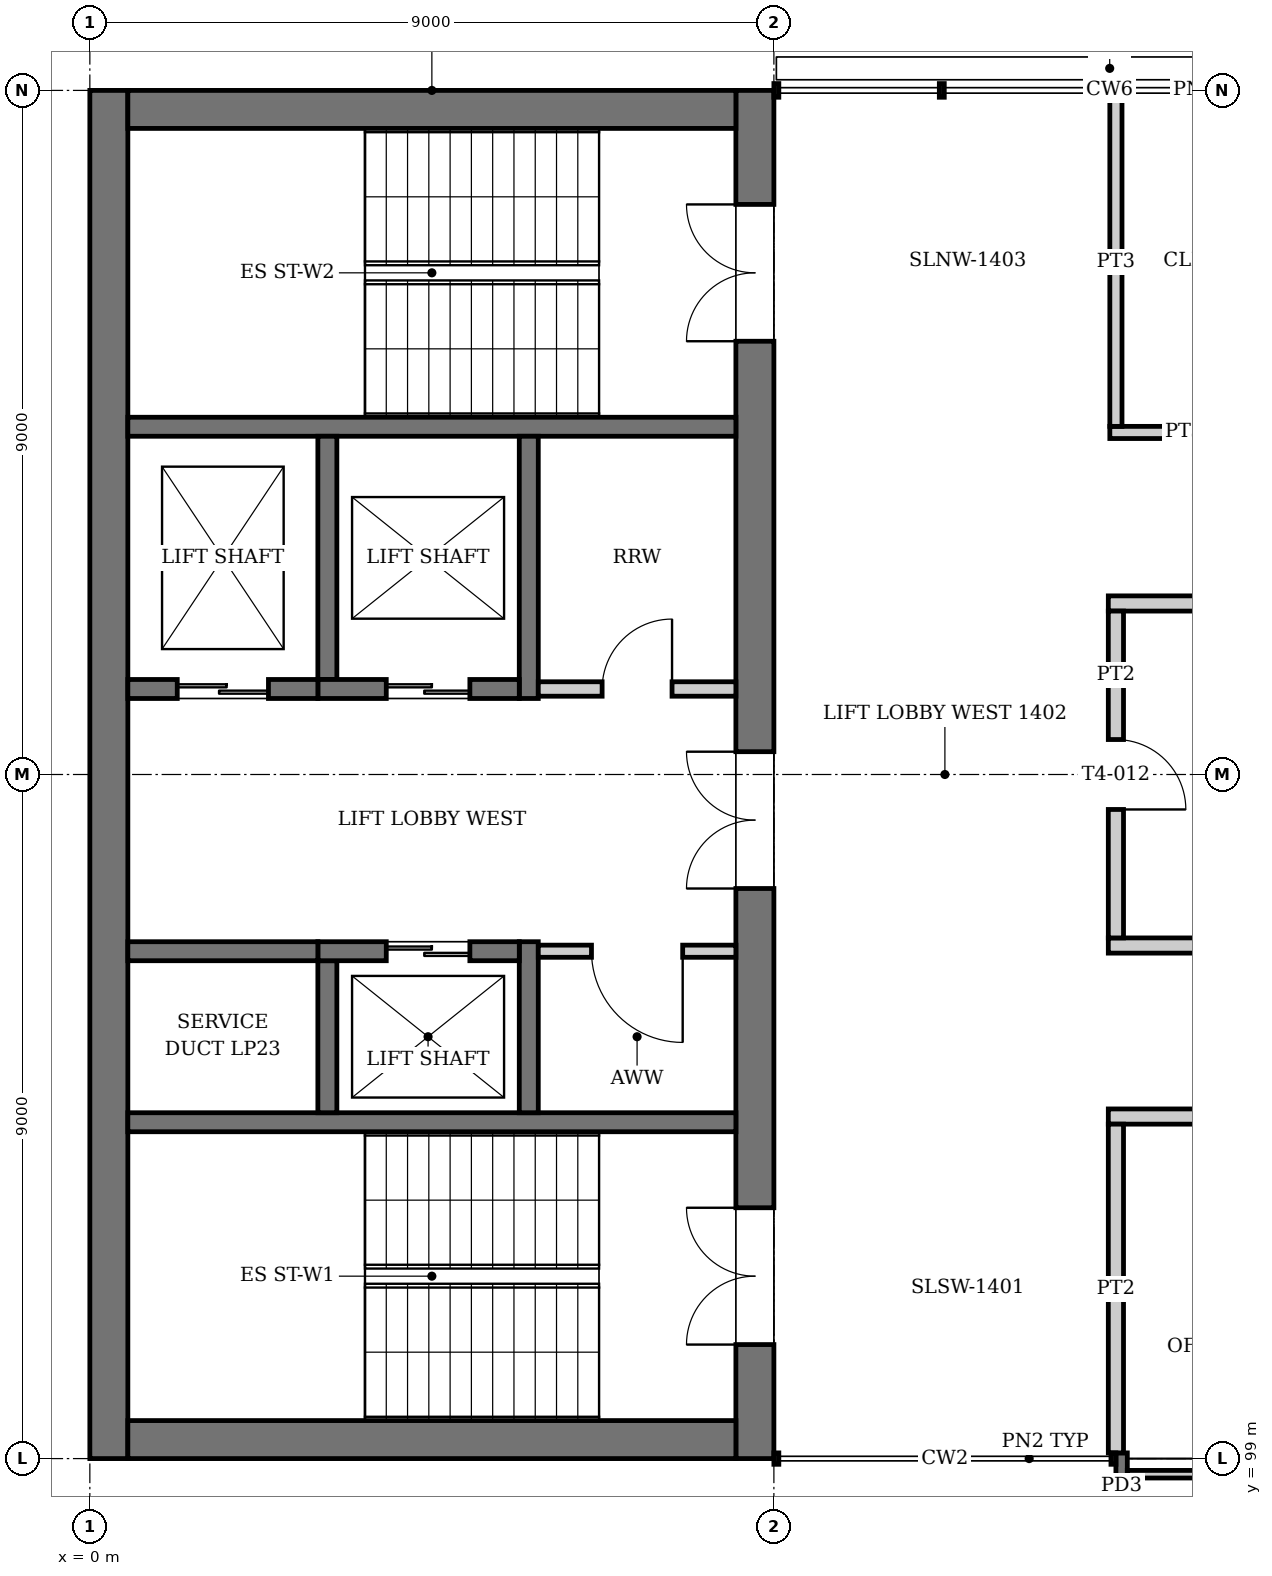
"""IFC4 building model, lengths in metres.
Left out: names, types, materials, properties, quantities, classifications, styles, units other than length and angle.
Written with IfcOpenShell. Run it as: python <this file> out.ifc"""

import sys

from ifc_helpers import new_model, si_unit, direction, frame, frame_2d, origin, place, context, subcontext, project, spatial, rectangle, extrude, element, fill, save


model = new_model("IFC4")
c1 = context("Model", 3, precision=1e-05, world=origin(), true_north=direction((0.0, 1.0)))
c2 = subcontext(c1, "Body", "Model", "MODEL_VIEW")
j1 = project(units=[si_unit("LENGTHUNIT", "METRE"), si_unit("PLANEANGLEUNIT", "RADIAN")], contexts=[c1])
p1 = place(None, origin())
s1 = spatial("IfcSite", under=j1, at=p1, CompositionType="ELEMENT")
p2 = place(p1, origin())
s2 = spatial("IfcBuilding", under=s1, at=p2, CompositionType="ELEMENT")
p3 = place(p2, frame((0.0, 0.0, 59.2)))
s3 = spatial("IfcBuildingStorey", under=s2, at=p3, CompositionType="ELEMENT", Elevation=59.2)
p4 = place(p3, frame((0.25, 99.0, 0.0), z_axis=(0.0, 0.0, 1.0), x_axis=(0.0, 1.0, 0.0)))
e1 = element("IfcWall", 1, at=p4, inside=s3, PredefinedType="SHEAR", context=c2, shape_type="SweptSolid", body=[
    extrude(rectangle(XDim=18.0, YDim=0.5, at=frame_2d((9.0, 0.0))), origin(), (0.0, 0.0, 1.0), 4.0),
])
p5 = place(p3, frame((8.75, 99.0, 0.0), z_axis=(0.0, 0.0, 1.0), x_axis=(0.0, 1.0, 0.0)))
e2 = element("IfcWall", 2, at=p5, inside=s3, PredefinedType="SHEAR", context=c2, shape_type="SweptSolid", body=[
    extrude(rectangle(XDim=18.0, YDim=0.5, at=frame_2d((9.0, 0.0))), origin(), (0.0, 0.0, 1.0), 4.0),
])
p6 = place(p5, frame((1.5, 0.0, 0.0)))
e3 = element("IfcOpeningElement", 3, at=p6, cuts=e2, PredefinedType="OPENING", context=c2, shape_type="SweptSolid", body=[
    extrude(rectangle(XDim=1.8, YDim=2.1, at=frame_2d((0.9, 1.05))), frame((0.0, 0.26, 0.0), z_axis=(0.0, -1.0, 0.0), x_axis=(1.0, 0.0, 0.0)), (0.0, 0.0, 1.0), 0.52),
])
p7 = place(p5, frame((14.7, 0.0, 0.0)))
e4 = element("IfcOpeningElement", 4, at=p7, cuts=e2, PredefinedType="OPENING", context=c2, shape_type="SweptSolid", body=[
    extrude(rectangle(XDim=1.8, YDim=2.1, at=frame_2d((0.9, 1.05))), frame((0.0, 0.26, 0.0), z_axis=(0.0, -1.0, 0.0), x_axis=(1.0, 0.0, 0.0)), (0.0, 0.0, 1.0), 0.52),
])
p8 = place(p5, frame((7.5, 0.0, 0.0)))
e5 = element("IfcOpeningElement", 5, at=p8, cuts=e2, PredefinedType="OPENING", context=c2, shape_type="SweptSolid", body=[
    extrude(rectangle(XDim=1.8, YDim=2.1, at=frame_2d((0.9, 1.05))), frame((0.0, 0.26, 0.0), z_axis=(0.0, -1.0, 0.0), x_axis=(1.0, 0.0, 0.0)), (0.0, 0.0, 1.0), 0.52),
])
for number, where, z_axis, x_axis in (
    (6, (0.5, 99.25, 0.0), (0.0, 0.0, 1.0), (1.0, 0.0, 0.0)),
    (7, (0.5, 116.75, 0.0), (0.0, 0.0, 1.0), (1.0, 0.0, 0.0)),
):
    element("IfcWall", number, at=place(p3, frame(where, z_axis=z_axis, x_axis=x_axis)), inside=s3, PredefinedType="SHEAR", context=c2, shape_type="SweptSolid", body=[
        extrude(rectangle(XDim=8.0, YDim=0.5, at=frame_2d((4.0, 0.0))), origin(), (0.0, 0.0, 1.0), 4.0),
    ])
p9 = place(p3, frame((13.575, 95.55, -0.15), z_axis=(0.0, 0.0, 1.0), x_axis=(0.0, 1.0, 0.0)))
e8 = element("IfcWall", 8, at=p9, inside=s3, PredefinedType="SOLIDWALL", context=c2, shape_type="SweptSolid", body=[
    extrude(rectangle(XDim=3.525, YDim=0.15, at=frame_2d((1.762, 0.0))), origin(), (0.0, 0.0, 1.0), 2.75),
])
p10 = place(p9, frame((0.647, 0.0, 1.05)))
e9 = element("IfcOpeningElement", 9, at=p10, cuts=e8, PredefinedType="OPENING", context=c2, shape_type="SweptSolid", body=[
    extrude(rectangle(XDim=2.0, YDim=1.4, at=frame_2d((1.0, 0.7))), frame((0.0, 0.085, 0.0), z_axis=(0.0, -1.0, 0.0), x_axis=(1.0, 0.0, 0.0)), (0.0, 0.0, 1.0), 0.17),
])
p11 = place(p3, frame((13.65, 98.794, 0.0), z_axis=(0.0, 0.0, 1.0), x_axis=(1.0, 0.0, 0.0)))
e10 = element("IfcWall", 10, at=p11, inside=s3, PredefinedType="PARTITIONING", context=c2, shape_type="SweptSolid", body=[
    extrude(rectangle(XDim=8.7, YDim=0.1, at=frame_2d((4.35, 0.0))), origin(), (0.0, 0.0, 1.0), 2.6),
])
p12 = place(p11, frame((4.6, 0.0, 0.0)))
e11 = element("IfcOpeningElement", 11, at=p12, cuts=e10, PredefinedType="OPENING", context=c2, shape_type="SweptSolid", body=[
    extrude(rectangle(XDim=0.9, YDim=2.1, at=frame_2d((0.45, 1.05))), frame((0.0, 0.06, 0.0), z_axis=(0.0, -1.0, 0.0), x_axis=(1.0, 0.0, 0.0)), (0.0, 0.0, 1.0), 0.12),
])
for number, where, z_axis, x_axis in (
    (12, (8.5, 103.425, 0.0), (0.0, 0.0, 1.0), (-1.0, 0.0, 0.0)),
    (13, (8.5, 112.575, 0.0), (0.0, 0.0, 1.0), (-1.0, 0.0, 0.0)),
):
    element("IfcWall", number, at=place(p3, frame(where, z_axis=z_axis, x_axis=x_axis)), inside=s3, PredefinedType="SOLIDWALL", context=c2, shape_type="SweptSolid", body=[
        extrude(rectangle(XDim=8.0, YDim=0.25, at=frame_2d((4.0, 0.0))), origin(), (0.0, 0.0, 1.0), 3.75),
    ])
p13 = place(p3, frame((5.775, 103.55, 0.0), z_axis=(0.0, 0.0, 1.0), x_axis=(0.0, 1.0, 0.0)))
e14 = element("IfcWall", 14, at=p13, inside=s3, PredefinedType="SOLIDWALL", context=c2, shape_type="SweptSolid", body=[
    extrude(rectangle(XDim=2.25, YDim=0.25, at=frame_2d((1.125, 0.0))), origin(), (0.0, 0.0, 1.0), 4.0),
])
p14 = place(p3, frame((3.125, 103.55, 0.0), z_axis=(0.0, 0.0, 1.0), x_axis=(0.0, 1.0, 0.0)))
e15 = element("IfcWall", 15, at=p14, inside=s3, PredefinedType="SOLIDWALL", context=c2, shape_type="SweptSolid", body=[
    extrude(rectangle(XDim=2.0, YDim=0.25, at=frame_2d((1.0, 0.0))), origin(), (0.0, 0.0, 1.0), 4.0),
])
p15 = place(p3, frame((5.65, 105.675, 0.0), z_axis=(0.0, 0.0, 1.0), x_axis=(-1.0, 0.0, 0.0)))
e16 = element("IfcWall", 16, at=p15, inside=s3, PredefinedType="SOLIDWALL", context=c2, shape_type="SweptSolid", body=[
    extrude(rectangle(XDim=2.65, YDim=0.25, at=frame_2d((1.325, 0.0))), origin(), (0.0, 0.0, 1.0), 4.0),
])
p16 = place(p15, frame((0.65, 0.0, 0.0)))
e17 = element("IfcOpeningElement", 17, at=p16, cuts=e16, PredefinedType="OPENING", context=c2, shape_type="SweptSolid", body=[
    extrude(rectangle(XDim=1.1, YDim=2.1, at=frame_2d((0.55, 1.05))), frame((0.0, 0.135, 0.0), z_axis=(0.0, -1.0, 0.0), x_axis=(1.0, 0.0, 0.0)), (0.0, 0.0, 1.0), 0.27),
])
p17 = place(p3, frame((3.0, 105.675, 0.0), z_axis=(0.0, 0.0, 1.0), x_axis=(-1.0, 0.0, 0.0)))
e18 = element("IfcWall", 18, at=p17, inside=s3, PredefinedType="SOLIDWALL", context=c2, shape_type="SweptSolid", body=[
    extrude(rectangle(XDim=2.5, YDim=0.25, at=frame_2d((1.25, 0.0))), origin(), (0.0, 0.0, 1.0), 4.0),
])
p18 = place(p3, frame((5.775, 109.0, 0.0), z_axis=(0.0, 0.0, 1.0), x_axis=(0.0, 1.0, 0.0)))
e19 = element("IfcWall", 19, at=p18, inside=s3, PredefinedType="SOLIDWALL", context=c2, shape_type="SweptSolid", body=[
    extrude(rectangle(XDim=3.45, YDim=0.25, at=frame_2d((1.725, 0.0))), origin(), (0.0, 0.0, 1.0), 4.0),
])
p19 = place(p3, frame((3.125, 109.25, 0.0), z_axis=(0.0, 0.0, 1.0), x_axis=(0.0, 1.0, 0.0)))
e20 = element("IfcWall", 20, at=p19, inside=s3, PredefinedType="SOLIDWALL", context=c2, shape_type="SweptSolid", body=[
    extrude(rectangle(XDim=3.2, YDim=0.25, at=frame_2d((1.6, 0.0))), origin(), (0.0, 0.0, 1.0), 4.0),
])
p20 = place(p3, frame((5.65, 109.125, 0.0), z_axis=(0.0, 0.0, 1.0), x_axis=(-1.0, 0.0, 0.0)))
e21 = element("IfcWall", 21, at=p20, inside=s3, PredefinedType="SOLIDWALL", context=c2, shape_type="SweptSolid", body=[
    extrude(rectangle(XDim=2.65, YDim=0.25, at=frame_2d((1.325, 0.0))), origin(), (0.0, 0.0, 1.0), 4.0),
])
p21 = place(p20, frame((0.65, 0.0, 0.0)))
e22 = element("IfcOpeningElement", 22, at=p21, cuts=e21, PredefinedType="OPENING", context=c2, shape_type="SweptSolid", body=[
    extrude(rectangle(XDim=1.1, YDim=2.1, at=frame_2d((0.55, 1.05))), frame((0.0, 0.135, 0.0), z_axis=(0.0, -1.0, 0.0), x_axis=(1.0, 0.0, 0.0)), (0.0, 0.0, 1.0), 0.27),
])
p22 = place(p3, frame((3.0, 109.125, 0.0), z_axis=(0.0, 0.0, 1.0), x_axis=(-1.0, 0.0, 0.0)))
e23 = element("IfcWall", 23, at=p22, inside=s3, PredefinedType="SOLIDWALL", context=c2, shape_type="SweptSolid", body=[
    extrude(rectangle(XDim=2.5, YDim=0.25, at=frame_2d((1.25, 0.0))), origin(), (0.0, 0.0, 1.0), 4.0),
])
p23 = place(p22, frame((0.65, 0.0, 0.0)))
e24 = element("IfcOpeningElement", 24, at=p23, cuts=e23, PredefinedType="OPENING", context=c2, shape_type="SweptSolid", body=[
    extrude(rectangle(XDim=1.2, YDim=2.1, at=frame_2d((0.6, 1.05))), frame((0.0, 0.135, 0.0), z_axis=(0.0, -1.0, 0.0), x_axis=(1.0, 0.0, 0.0)), (0.0, 0.0, 1.0), 0.27),
])
p24 = place(p3, frame((8.5, 105.675, 0.0), z_axis=(0.0, 0.0, 1.0), x_axis=(-1.0, 0.0, 0.0)))
e25 = element("IfcWall", 25, at=p24, inside=s3, PredefinedType="PARTITIONING", context=c2, shape_type="SweptSolid", body=[
    extrude(rectangle(XDim=2.6, YDim=0.16, at=frame_2d((1.3, 0.0))), origin(), (0.0, 0.0, 1.0), 3.75),
])
p25 = place(p24, frame((0.7, 0.0, 0.0)))
e26 = element("IfcOpeningElement", 26, at=p25, cuts=e25, PredefinedType="OPENING", context=c2, shape_type="SweptSolid", body=[
    extrude(rectangle(XDim=1.2, YDim=2.1, at=frame_2d((0.6, 1.05))), frame((0.0, 0.09, 0.0), z_axis=(0.0, -1.0, 0.0), x_axis=(1.0, 0.0, 0.0)), (0.0, 0.0, 1.0), 0.18),
])
p26 = place(p3, frame((8.5, 109.125, 0.0), z_axis=(0.0, 0.0, 1.0), x_axis=(-1.0, 0.0, 0.0)))
e27 = element("IfcWall", 27, at=p26, inside=s3, PredefinedType="PARTITIONING", context=c2, shape_type="SweptSolid", body=[
    extrude(rectangle(XDim=2.6, YDim=0.19, at=frame_2d((1.3, 0.0))), origin(), (0.0, 0.0, 1.0), 3.75),
])
p27 = place(p26, frame((0.84, 0.0, 0.0)))
e28 = element("IfcOpeningElement", 28, at=p27, cuts=e27, PredefinedType="OPENING", context=c2, shape_type="SweptSolid", body=[
    extrude(rectangle(XDim=0.92, YDim=2.1, at=frame_2d((0.46, 1.05))), frame((0.0, 0.105, 0.0), z_axis=(0.0, -1.0, 0.0), x_axis=(1.0, 0.0, 0.0)), (0.0, 0.0, 1.0), 0.21),
])
p28 = place(p3, frame((13.4, 103.5, 0.0), z_axis=(0.0, 0.0, 1.0), x_axis=(1.0, 0.0, 0.0)))
e29 = element("IfcWall", 29, at=p28, inside=s3, PredefinedType="PARTITIONING", context=c2, shape_type="SweptSolid", body=[
    extrude(rectangle(XDim=27.2, YDim=0.2, at=frame_2d((13.6, 0.0))), origin(), (0.0, 0.0, 1.0), 3.05),
])
p29 = place(p28, frame((1.85, 0.0, 0.0)))
e30 = element("IfcOpeningElement", 30, at=p29, cuts=e29, PredefinedType="OPENING", context=c2, shape_type="SweptSolid", body=[
    extrude(rectangle(XDim=1.0, YDim=2.1, at=frame_2d((0.5, 1.05))), frame((0.0, 0.11, 0.0), z_axis=(0.0, -1.0, 0.0), x_axis=(1.0, 0.0, 0.0)), (0.0, 0.0, 1.0), 0.22),
])
p30 = place(p28, frame((6.35, 0.0, 0.0)))
e31 = element("IfcOpeningElement", 31, at=p30, cuts=e29, PredefinedType="OPENING", context=c2, shape_type="SweptSolid", body=[
    extrude(rectangle(XDim=1.0, YDim=2.1, at=frame_2d((0.5, 1.05))), frame((0.0, 0.11, 0.0), z_axis=(0.0, -1.0, 0.0), x_axis=(1.0, 0.0, 0.0)), (0.0, 0.0, 1.0), 0.22),
])
p31 = place(p28, frame((10.85, 0.0, 0.0)))
e32 = element("IfcOpeningElement", 32, at=p31, cuts=e29, PredefinedType="OPENING", context=c2, shape_type="SweptSolid", body=[
    extrude(rectangle(XDim=1.0, YDim=2.1, at=frame_2d((0.5, 1.05))), frame((0.0, 0.11, 0.0), z_axis=(0.0, -1.0, 0.0), x_axis=(1.0, 0.0, 0.0)), (0.0, 0.0, 1.0), 0.22),
])
p32 = place(p28, frame((15.35, 0.0, 0.0)))
e33 = element("IfcOpeningElement", 33, at=p32, cuts=e29, PredefinedType="OPENING", context=c2, shape_type="SweptSolid", body=[
    extrude(rectangle(XDim=1.0, YDim=2.1, at=frame_2d((0.5, 1.05))), frame((0.0, 0.11, 0.0), z_axis=(0.0, -1.0, 0.0), x_axis=(1.0, 0.0, 0.0)), (0.0, 0.0, 1.0), 0.22),
])
p33 = place(p28, frame((19.85, 0.0, 0.0)))
e34 = element("IfcOpeningElement", 34, at=p33, cuts=e29, PredefinedType="OPENING", context=c2, shape_type="SweptSolid", body=[
    extrude(rectangle(XDim=1.0, YDim=2.1, at=frame_2d((0.5, 1.05))), frame((0.0, 0.11, 0.0), z_axis=(0.0, -1.0, 0.0), x_axis=(1.0, 0.0, 0.0)), (0.0, 0.0, 1.0), 0.22),
])
p34 = place(p28, frame((24.45, 0.0, 0.0)))
e35 = element("IfcOpeningElement", 35, at=p34, cuts=e29, PredefinedType="OPENING", context=c2, shape_type="SweptSolid", body=[
    extrude(rectangle(XDim=0.8, YDim=2.1, at=frame_2d((0.4, 1.05))), frame((0.0, 0.11, 0.0), z_axis=(0.0, -1.0, 0.0), x_axis=(1.0, 0.0, 0.0)), (0.0, 0.0, 1.0), 0.22),
])
p35 = place(p3, frame((13.4, 105.75, 0.0), z_axis=(0.0, 0.0, 1.0), x_axis=(1.0, 0.0, 0.0)))
e36 = element("IfcWall", 36, at=p35, inside=s3, PredefinedType="PARTITIONING", context=c2, shape_type="SweptSolid", body=[
    extrude(rectangle(XDim=27.2, YDim=0.2, at=frame_2d((13.6, 0.0))), origin(), (0.0, 0.0, 1.0), 3.05),
])
p36 = place(p35, frame((12.9, 0.0, 0.0)))
e37 = element("IfcOpeningElement", 37, at=p36, cuts=e36, PredefinedType="OPENING", context=c2, shape_type="SweptSolid", body=[
    extrude(rectangle(XDim=1.4, YDim=2.1, at=frame_2d((0.7, 1.05))), frame((0.0, 0.11, 0.0), z_axis=(0.0, -1.0, 0.0), x_axis=(1.0, 0.0, 0.0)), (0.0, 0.0, 1.0), 0.22),
])
p37 = place(p3, frame((13.4, 110.25, 0.0), z_axis=(0.0, 0.0, 1.0), x_axis=(1.0, 0.0, 0.0)))
e38 = element("IfcWall", 38, at=p37, inside=s3, PredefinedType="PARTITIONING", context=c2, shape_type="SweptSolid", body=[
    extrude(rectangle(XDim=27.2, YDim=0.2, at=frame_2d((13.6, 0.0))), origin(), (0.0, 0.0, 1.0), 3.05),
])
p38 = place(p37, frame((12.9, 0.0, 0.0)))
e39 = element("IfcOpeningElement", 39, at=p38, cuts=e38, PredefinedType="OPENING", context=c2, shape_type="SweptSolid", body=[
    extrude(rectangle(XDim=1.4, YDim=2.1, at=frame_2d((0.7, 1.05))), frame((0.0, 0.11, 0.0), z_axis=(0.0, -1.0, 0.0), x_axis=(1.0, 0.0, 0.0)), (0.0, 0.0, 1.0), 0.22),
])
p39 = place(p3, frame((13.42, 112.5, 0.0), z_axis=(0.0, 0.0, 1.0), x_axis=(1.0, 0.0, 0.0)))
e40 = element("IfcWall", 40, at=p39, inside=s3, PredefinedType="PARTITIONING", context=c2, shape_type="SweptSolid", body=[
    extrude(rectangle(XDim=4.66, YDim=0.16, at=frame_2d((2.33, 0.0))), origin(), (0.0, 0.0, 1.0), 3.05),
])
p40 = place(p39, frame((1.955, 0.0, 0.0)))
e41 = element("IfcOpeningElement", 41, at=p40, cuts=e40, PredefinedType="OPENING", context=c2, shape_type="SweptSolid", body=[
    extrude(rectangle(XDim=0.75, YDim=2.1, at=frame_2d((0.375, 1.05))), frame((0.0, 0.09, 0.0), z_axis=(0.0, -1.0, 0.0), x_axis=(1.0, 0.0, 0.0)), (0.0, 0.0, 1.0), 0.18),
])
p41 = place(p3, frame((13.5, 99.075, 0.0), z_axis=(0.0, 0.0, 1.0), x_axis=(0.0, 1.0, 0.0)))
e42 = element("IfcWall", 42, at=p41, inside=s3, PredefinedType="PARTITIONING", context=c2, shape_type="SweptSolid", body=[
    extrude(rectangle(XDim=4.325, YDim=0.2, at=frame_2d((2.163, 0.0))), origin(), (0.0, 0.0, 1.0), 3.05),
])
p42 = place(p3, frame((13.5, 105.85, 0.0), z_axis=(0.0, 0.0, 1.0), x_axis=(0.0, 1.0, 0.0)))
e43 = element("IfcWall", 43, at=p42, inside=s3, PredefinedType="PARTITIONING", context=c2, shape_type="SweptSolid", body=[
    extrude(rectangle(XDim=4.3, YDim=0.2, at=frame_2d((2.15, 0.0))), origin(), (0.0, 0.0, 1.0), 3.05),
])
p43 = place(p42, frame((1.69, 0.0, 0.0)))
e44 = element("IfcOpeningElement", 44, at=p43, cuts=e43, PredefinedType="OPENING", context=c2, shape_type="SweptSolid", body=[
    extrude(rectangle(XDim=0.92, YDim=2.1, at=frame_2d((0.46, 1.05))), frame((0.0, 0.11, 0.0), z_axis=(0.0, -1.0, 0.0), x_axis=(1.0, 0.0, 0.0)), (0.0, 0.0, 1.0), 0.22),
])
p44 = place(p3, frame((13.5, 112.58, 0.0), z_axis=(0.0, 0.0, 1.0), x_axis=(0.0, 1.0, 0.0)))
e45 = element("IfcWall", 45, at=p44, inside=s3, PredefinedType="PARTITIONING", context=c2, shape_type="SweptSolid", body=[
    extrude(rectangle(XDim=4.33, YDim=0.16, at=frame_2d((2.165, 0.0))), origin(), (0.0, 0.0, 1.0), 3.05),
])
p45 = place(p16, origin())
e46 = element("IfcDoor", 46, at=p45, inside=s3, OperationType="DOUBLE_DOOR_SLIDING", PredefinedType="DOOR", context=c2, shape_type="SweptSolid", body=[
    extrude(rectangle(XDim=1.1, YDim=2.1, at=frame_2d((0.55, 1.05))), frame((0.0, 0.025, 0.0), z_axis=(0.0, -1.0, 0.0), x_axis=(1.0, 0.0, 0.0)), (0.0, 0.0, 1.0), 0.05),
])
fill(e17, e46)
p46 = place(p21, origin())
e47 = element("IfcDoor", 47, at=p46, inside=s3, OperationType="DOUBLE_DOOR_SLIDING", PredefinedType="DOOR", context=c2, shape_type="SweptSolid", body=[
    extrude(rectangle(XDim=1.1, YDim=2.1, at=frame_2d((0.55, 1.05))), frame((0.0, 0.025, 0.0), z_axis=(0.0, -1.0, 0.0), x_axis=(1.0, 0.0, 0.0)), (0.0, 0.0, 1.0), 0.05),
])
fill(e22, e47)
p47 = place(p23, origin())
e48 = element("IfcDoor", 48, at=p47, inside=s3, OperationType="DOUBLE_DOOR_SLIDING", PredefinedType="DOOR", context=c2, shape_type="SweptSolid", body=[
    extrude(rectangle(XDim=1.2, YDim=2.1, at=frame_2d((0.6, 1.05))), frame((0.0, 0.025, 0.0), z_axis=(0.0, -1.0, 0.0), x_axis=(1.0, 0.0, 0.0)), (0.0, 0.0, 1.0), 0.05),
])
fill(e24, e48)
p48 = place(p43, frame((0.92, 0.0, 0.0), z_axis=(0.0, 0.0, 1.0), x_axis=(-1.0, 0.0, 0.0)))
e49 = element("IfcDoor", 49, at=p48, inside=s3, OperationType="SINGLE_SWING_RIGHT", PredefinedType="DOOR", context=c2, shape_type="SweptSolid", body=[
    extrude(rectangle(XDim=0.92, YDim=2.1, at=frame_2d((0.46, 1.05))), frame((0.0, 0.025, 0.0), z_axis=(0.0, -1.0, 0.0), x_axis=(1.0, 0.0, 0.0)), (0.0, 0.0, 1.0), 0.05),
])
fill(e44, e49)
p49 = place(p6, origin())
e50 = element("IfcDoor", 50, at=p49, inside=s3, OperationType="DOUBLE_DOOR_SINGLE_SWING", PredefinedType="DOOR", context=c2, shape_type="SweptSolid", body=[
    extrude(rectangle(XDim=1.8, YDim=2.1, at=frame_2d((0.9, 1.05))), frame((0.0, 0.025, 0.0), z_axis=(0.0, -1.0, 0.0), x_axis=(1.0, 0.0, 0.0)), (0.0, 0.0, 1.0), 0.05),
])
fill(e3, e50)
p50 = place(p7, origin())
e51 = element("IfcDoor", 51, at=p50, inside=s3, OperationType="DOUBLE_DOOR_SINGLE_SWING", PredefinedType="DOOR", context=c2, shape_type="SweptSolid", body=[
    extrude(rectangle(XDim=1.8, YDim=2.1, at=frame_2d((0.9, 1.05))), frame((0.0, 0.025, 0.0), z_axis=(0.0, -1.0, 0.0), x_axis=(1.0, 0.0, 0.0)), (0.0, 0.0, 1.0), 0.05),
])
fill(e4, e51)
p51 = place(p8, origin())
e52 = element("IfcDoor", 52, at=p51, inside=s3, OperationType="DOUBLE_DOOR_SINGLE_SWING", PredefinedType="DOOR", context=c2, shape_type="SweptSolid", body=[
    extrude(rectangle(XDim=1.8, YDim=2.1, at=frame_2d((0.9, 1.05))), frame((0.0, 0.025, 0.0), z_axis=(0.0, -1.0, 0.0), x_axis=(1.0, 0.0, 0.0)), (0.0, 0.0, 1.0), 0.05),
])
fill(e5, e52)
p52 = place(p25, origin())
e53 = element("IfcDoor", 53, at=p52, inside=s3, OperationType="SINGLE_SWING_LEFT", PredefinedType="DOOR", context=c2, shape_type="SweptSolid", body=[
    extrude(rectangle(XDim=1.2, YDim=2.1, at=frame_2d((0.6, 1.05))), frame((0.0, 0.025, 0.0), z_axis=(0.0, -1.0, 0.0), x_axis=(1.0, 0.0, 0.0)), (0.0, 0.0, 1.0), 0.05),
])
fill(e26, e53)
p53 = place(p27, frame((0.92, 0.0, 0.0), z_axis=(0.0, 0.0, 1.0), x_axis=(-1.0, 0.0, 0.0)))
e54 = element("IfcDoor", 54, at=p53, inside=s3, OperationType="SINGLE_SWING_RIGHT", PredefinedType="DOOR", context=c2, shape_type="SweptSolid", body=[
    extrude(rectangle(XDim=0.92, YDim=2.1, at=frame_2d((0.46, 1.05))), frame((0.0, 0.025, 0.0), z_axis=(0.0, -1.0, 0.0), x_axis=(1.0, 0.0, 0.0)), (0.0, 0.0, 1.0), 0.05),
])
fill(e28, e54)
save(model, sys.argv[1])
